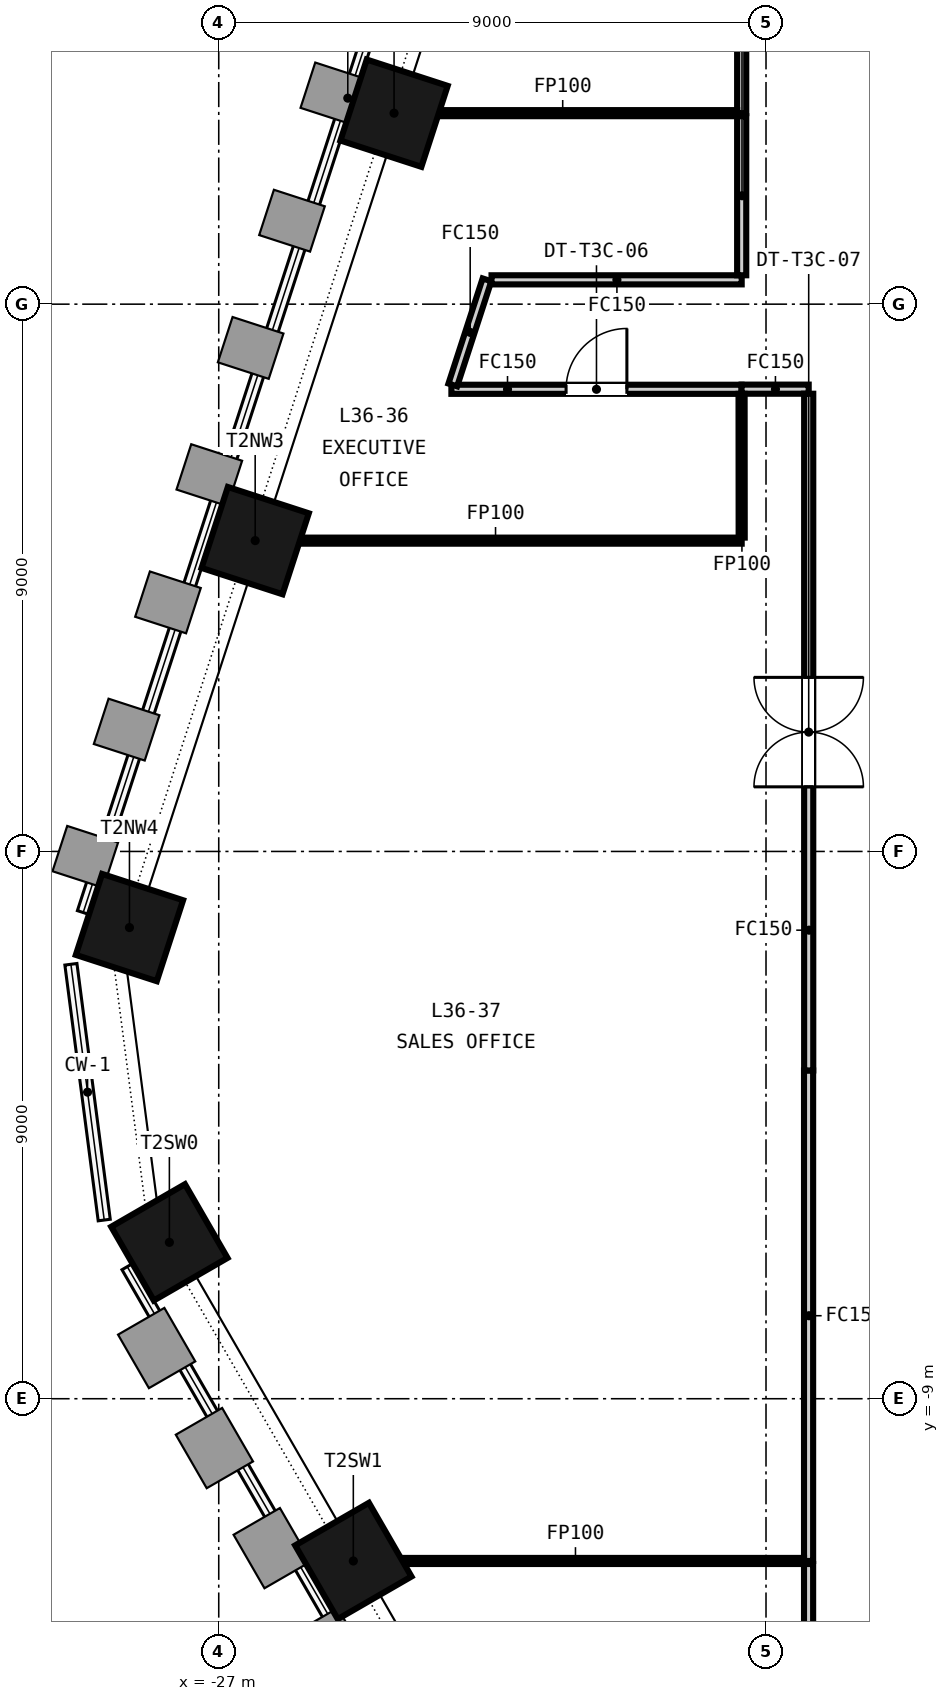
"""IFC4 building model, lengths in metres.
Left out: names, types, materials, properties, quantities, classifications, styles, units other than length and angle.
Written with IfcOpenShell. Run it as: python <this file> out.ifc"""

import sys

from ifc_helpers import new_model, si_unit, direction, frame, frame_2d, origin, origin_2d, place, context, subcontext, project, spatial, rectangle, extrude, element, fill, save


model = new_model("IFC4")
c1 = context("Model", 3, precision=1e-05, world=origin(), true_north=direction((0.0, 1.0)))
c2 = subcontext(c1, "Body", "Model", "MODEL_VIEW")
j1 = project(units=[si_unit("LENGTHUNIT", "METRE"), si_unit("PLANEANGLEUNIT", "RADIAN")], contexts=[c1])
p1 = place(None, origin())
s1 = spatial("IfcSite", under=j1, at=p1, CompositionType="ELEMENT")
p2 = place(p1, origin())
s2 = spatial("IfcBuilding", under=s1, at=p2, CompositionType="ELEMENT")
p3 = place(p2, frame((0.0, 0.0, 148.05)))
s3 = spatial("IfcBuildingStorey", under=s2, at=p3, CompositionType="ELEMENT", Elevation=148.05)
for number, where, z_axis, x_axis in (
    (1, (-24.117, 12.141, -0.15), (0.0, 0.0, 1.0), (-0.309, -0.951, 0.0)),
    (2, (-26.401, 5.111, -0.15), (0.0, 0.0, 1.0), (-0.309, -0.951, 0.0)),
    (3, (-28.468, -1.252, -0.15), (0.0, 0.0, 1.0), (-0.309, -0.951, 0.0)),
    (4, (-27.812, -6.429, -0.15), (0.0, 0.0, 1.0), (0.5, -0.866, 0.0)),
    (5, (-24.787, -11.668, -0.15), (0.0, 0.0, 1.0), (0.5, -0.866, 0.0)),
):
    element("IfcColumn", number, at=place(p3, frame(where, z_axis=z_axis, x_axis=x_axis)), inside=s3, PredefinedType="COLUMN", context=c2, shape_type="SweptSolid", body=[
        extrude(rectangle(XDim=1.4, YDim=1.4, at=origin_2d()), origin(), (0.0, 0.0, 1.0), 3.65),
    ])
p4 = place(p3, frame((-23.174, 7.6, 0.0), z_axis=(0.0, 0.0, 1.0), x_axis=(1.0, 0.0, 0.0)))
e6 = element("IfcWall", 6, at=p4, inside=s3, PredefinedType="PARTITIONING", context=c2, shape_type="SweptSolid", body=[
    extrude(rectangle(XDim=4.772, YDim=0.15, at=frame_2d((2.386, 0.0))), origin(), (0.0, 0.0, 1.0), 2.741),
])
p5 = place(p4, frame((1.886, 0.0, 0.0)))
e7 = element("IfcOpeningElement", 7, at=p5, cuts=e6, PredefinedType="OPENING", context=c2, shape_type="SweptSolid", body=[
    extrude(rectangle(XDim=1.0, YDim=2.1, at=frame_2d((0.5, 1.05))), frame((0.0, 0.085, 0.0), z_axis=(0.0, -1.0, 0.0), x_axis=(1.0, 0.0, 0.0)), (0.0, 0.0, 1.0), 0.17),
])
p6 = place(p3, frame((-17.298, 7.602, 0.0), z_axis=(0.0, 0.0, 1.0), x_axis=(-1.0, 0.0, 0.0)))
e8 = element("IfcWall", 8, at=p6, inside=s3, PredefinedType="PARTITIONING", context=c2, shape_type="SweptSolid", body=[
    extrude(rectangle(XDim=1.104, YDim=0.15, at=frame_2d((0.552, 0.0))), origin(), (0.0, 0.0, 1.0), 2.741),
])
p7 = place(p3, frame((-18.4, 12.141, 0.0), z_axis=(0.0, 0.0, 1.0), x_axis=(0.0, 1.0, 0.0)))
e9 = element("IfcWall", 9, at=p7, inside=s3, PredefinedType="PARTITIONING", context=c2, shape_type="SweptSolid", body=[
    extrude(rectangle(XDim=3.384, YDim=0.15, at=frame_2d((1.692, 0.0))), origin(), (0.0, 0.0, 1.0), 2.741),
])
p8 = place(p3, frame((-24.222, 12.141, 0.0), z_axis=(0.0, 0.0, 1.0), x_axis=(1.0, 0.0, 0.0)))
e10 = element("IfcWall", 10, at=p8, inside=s3, PredefinedType="PARTITIONING", context=c2, shape_type="SweptSolid", body=[
    extrude(rectangle(XDim=5.747, YDim=0.1, at=frame_2d((2.874, 0.0))), origin(), (0.0, 0.0, 1.0), 2.741),
])
p9 = place(p3, frame((-23.151, 7.671, 0.0), z_axis=(0.0, 0.0, 1.0), x_axis=(0.309086072338, 0.951034068731, 0.0)))
e11 = element("IfcWall", 11, at=p9, inside=s3, PredefinedType="PARTITIONING", context=c2, shape_type="SweptSolid", body=[
    extrude(rectangle(XDim=1.818, YDim=0.15, at=frame_2d((0.909, 0.0))), origin(), (0.0, 0.0, 1.0), 2.741),
])
p10 = place(p3, frame((-22.514, 9.4, 0.0), z_axis=(0.0, 0.0, 1.0), x_axis=(1.0, 0.0, 0.0)))
e12 = element("IfcWall", 12, at=p10, inside=s3, PredefinedType="PARTITIONING", context=c2, shape_type="SweptSolid", body=[
    extrude(rectangle(XDim=4.114, YDim=0.15, at=frame_2d((2.057, 0.0))), origin(), (0.0, 0.0, 1.0), 2.741),
])
p11 = place(p3, frame((-18.4, 9.475, 0.0), z_axis=(0.0, 0.0, 1.0), x_axis=(0.0, 1.0, 0.0)))
e13 = element("IfcWall", 13, at=p11, inside=s3, PredefinedType="PARTITIONING", context=c2, shape_type="SweptSolid", body=[
    extrude(rectangle(XDim=2.616, YDim=0.15, at=frame_2d((1.308, 0.0))), origin(), (0.0, 0.0, 1.0), 2.741),
])
p12 = place(p3, frame((-26.506, 5.111, 0.0), z_axis=(0.0, 0.0, 1.0), x_axis=(1.0, 0.0, 0.0)))
e14 = element("IfcWall", 14, at=p12, inside=s3, PredefinedType="PARTITIONING", context=c2, shape_type="SweptSolid", body=[
    extrude(rectangle(XDim=8.106, YDim=0.1, at=frame_2d((4.053, 0.0))), origin(), (0.0, 0.0, 1.0), 2.741),
])
p13 = place(p3, frame((-17.3, -11.668, 0.0), z_axis=(0.0, 0.0, 1.0), x_axis=(0.0, 1.0, 0.0)))
e15 = element("IfcWall", 15, at=p13, inside=s3, PredefinedType="PARTITIONING", context=c2, shape_type="SweptSolid", body=[
    extrude(rectangle(XDim=8.066, YDim=0.15, at=frame_2d((4.033, 0.0))), origin(), (0.0, 0.0, 1.0), 2.741),
])
p14 = place(p3, frame((-17.298, -3.602, 0.0), z_axis=(0.0, 0.0, 1.0), x_axis=(0.0, 1.0, 0.0)))
e16 = element("IfcWall", 16, at=p14, inside=s3, PredefinedType="PARTITIONING", context=c2, shape_type="SweptSolid", body=[
    extrude(rectangle(XDim=11.129, YDim=0.15, at=frame_2d((5.564, 0.0))), origin(), (0.0, 0.0, 1.0), 2.741),
])
p15 = place(p14, frame((4.665, 0.0, 0.0)))
e17 = element("IfcOpeningElement", 17, at=p15, cuts=e16, PredefinedType="OPENING", context=c2, shape_type="SweptSolid", body=[
    extrude(rectangle(XDim=1.8, YDim=2.1, at=frame_2d((0.9, 1.05))), frame((0.0, 0.085, 0.0), z_axis=(0.0, -1.0, 0.0), x_axis=(1.0, 0.0, 0.0)), (0.0, 0.0, 1.0), 0.17),
])
p16 = place(p3, frame((-18.402, 7.525, 0.0), z_axis=(0.0, 0.0, 1.0), x_axis=(0.000826189948, -0.999999658705, 0.0)))
e18 = element("IfcWall", 18, at=p16, inside=s3, PredefinedType="PARTITIONING", context=c2, shape_type="SweptSolid", body=[
    extrude(rectangle(XDim=2.364, YDim=0.1, at=frame_2d((1.182, 0.0))), origin(), (0.0, 0.0, 1.0), 2.741),
])
p17 = place(p3, frame((-24.902, -11.668, 0.0), z_axis=(0.0, 0.0, 1.0), x_axis=(1.0, 0.0, 0.0)))
e19 = element("IfcWall", 19, at=p17, inside=s3, PredefinedType="PARTITIONING", context=c2, shape_type="SweptSolid", body=[
    extrude(rectangle(XDim=7.527, YDim=0.1, at=frame_2d((3.764, 0.0))), origin(), (0.0, 0.0, 1.0), 2.741),
])
p18 = place(p3, frame((-17.3, -15.525, 0.0), z_axis=(0.0, 0.0, 1.0), x_axis=(0.0, 1.0, 0.0)))
e20 = element("IfcWall", 20, at=p18, inside=s3, PredefinedType="PARTITIONING", context=c2, shape_type="SweptSolid", body=[
    extrude(rectangle(XDim=3.807, YDim=0.15, at=frame_2d((1.903, 0.0))), origin(), (0.0, 0.0, 1.0), 2.741),
])
p19 = place(p5, origin())
e21 = element("IfcDoor", 21, at=p19, inside=s3, OperationType="SINGLE_SWING_RIGHT", PredefinedType="DOOR", context=c2, shape_type="SweptSolid", body=[
    extrude(rectangle(XDim=1.0, YDim=2.1, at=frame_2d((0.5, 1.05))), frame((0.0, 0.025, 0.0), z_axis=(0.0, -1.0, 0.0), x_axis=(1.0, 0.0, 0.0)), (0.0, 0.0, 1.0), 0.05),
])
fill(e7, e21)
p20 = place(p15, origin())
e22 = element("IfcDoor", 22, at=p20, inside=s3, OperationType="DOUBLE_DOOR_DOUBLE_SWING", PredefinedType="DOOR", context=c2, shape_type="SweptSolid", body=[
    extrude(rectangle(XDim=1.8, YDim=2.1, at=frame_2d((0.9, 1.05))), frame((0.0, 0.025, 0.0), z_axis=(0.0, -1.0, 0.0), x_axis=(1.0, 0.0, 0.0)), (0.0, 0.0, 1.0), 0.05),
])
fill(e17, e22)
save(model, sys.argv[1])
